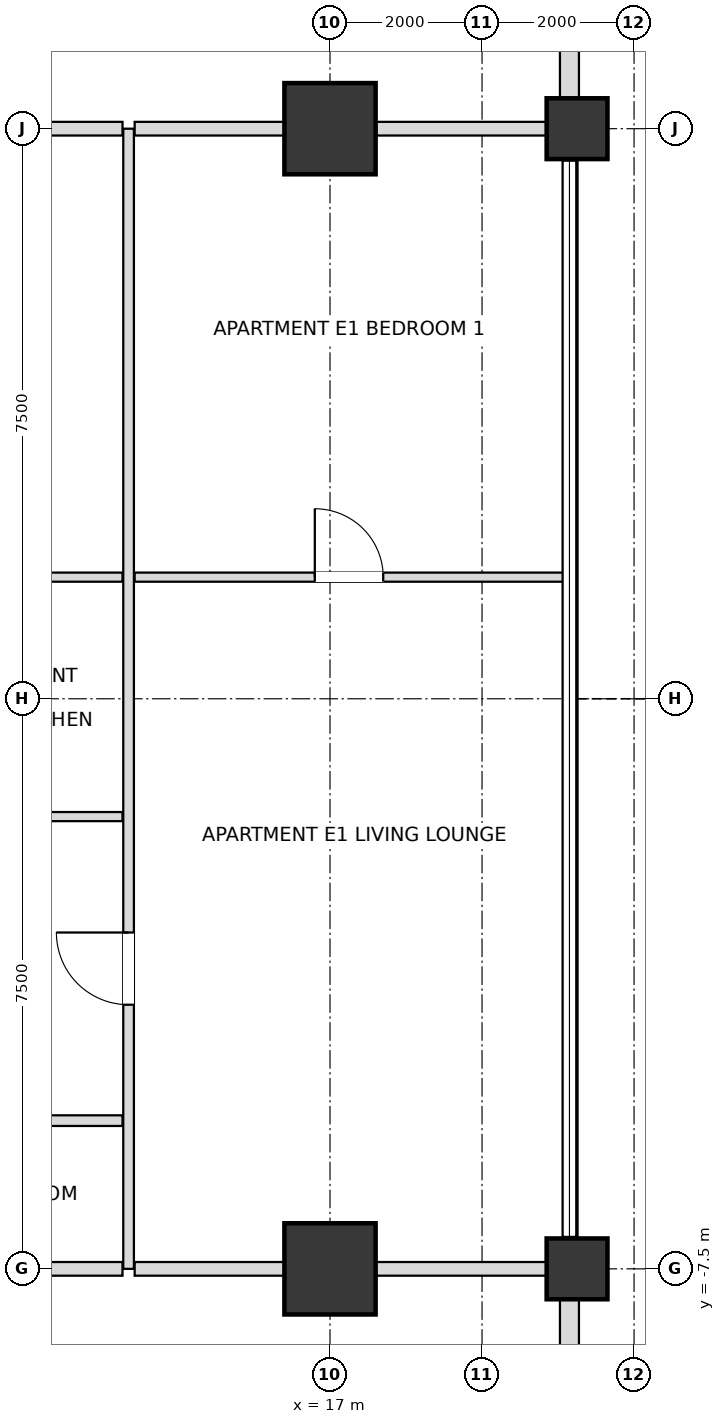
"""IFC4 building model, lengths in metres.
Left out: names, types, materials, properties, quantities, classifications, styles, units other than length and angle.
Written with IfcOpenShell. Run it as: python <this file> out.ifc"""

import sys

from ifc_helpers import new_model, si_unit, direction, frame, frame_2d, origin, origin_2d, place, context, subcontext, project, spatial, rectangle, extrude, element, fill, save


model = new_model("IFC4")
c1 = context("Model", 3, precision=1e-05, world=origin(), true_north=direction((0.0, 1.0)))
c2 = subcontext(c1, "Body", "Model", "MODEL_VIEW")
j1 = project(units=[si_unit("LENGTHUNIT", "METRE"), si_unit("PLANEANGLEUNIT", "RADIAN")], contexts=[c1])
p1 = place(None, origin())
s1 = spatial("IfcSite", under=j1, at=p1, CompositionType="ELEMENT")
p2 = place(p1, origin())
s2 = spatial("IfcBuilding", under=s1, at=p2, CompositionType="ELEMENT")
p3 = place(p2, frame((0.0, 0.0, 154.8)))
s3 = spatial("IfcBuildingStorey", under=s2, at=p3, CompositionType="ELEMENT", Elevation=154.8)
for number, where, z_axis, x_axis in (
    (1, (17.0, -7.5, 0.0), (0.0, 0.0, 1.0), (1.0, 0.0, 0.0)),
    (2, (17.0, 7.5, 0.0), (0.0, 0.0, 1.0), (1.0, 0.0, 0.0)),
):
    element("IfcColumn", number, at=place(p3, frame(where, z_axis=z_axis, x_axis=x_axis)), inside=s3, PredefinedType="USERDEFINED", context=c2, shape_type="SweptSolid", body=[
        extrude(rectangle(XDim=1.2, YDim=1.2, at=origin_2d()), origin(), (0.0, 0.0, 1.0), 3.6),
    ])
for number, where, z_axis, x_axis in (
    (3, (20.25, -7.5, 0.0), (0.0, 0.0, 1.0), (1.0, 0.0, 0.0)),
    (4, (20.25, 7.5, 0.0), (0.0, 0.0, 1.0), (1.0, 0.0, 0.0)),
):
    element("IfcColumn", number, at=place(p3, frame(where, z_axis=z_axis, x_axis=x_axis)), inside=s3, PredefinedType="COLUMN", context=c2, shape_type="SweptSolid", body=[
        extrude(rectangle(XDim=0.8, YDim=0.8, at=origin_2d()), origin(), (0.0, 0.0, 1.0), 3.6),
    ])
p4 = place(p3, frame((20.15, -12.605, 0.0), z_axis=(0.0, 0.0, 1.0), x_axis=(0.0, 1.0, 0.0)))
e5 = element("IfcWall", 5, at=p4, inside=s3, PredefinedType="SOLIDWALL", context=c2, shape_type="SweptSolid", body=[
    extrude(rectangle(XDim=4.71, YDim=0.25, at=frame_2d((2.355, 0.0))), origin(), (0.0, 0.0, 1.0), 2.736),
])
p5 = place(p4, frame((1.455, 0.0, 0.72)))
e6 = element("IfcOpeningElement", 6, at=p5, cuts=e5, PredefinedType="OPENING", context=c2, shape_type="SweptSolid", body=[
    extrude(rectangle(XDim=1.8, YDim=1.68, at=frame_2d((0.9, 0.84))), frame((0.0, 0.135, 0.0), z_axis=(0.0, -1.0, 0.0), x_axis=(1.0, 0.0, 0.0)), (0.0, 0.0, 1.0), 0.27),
])
p6 = place(p3, frame((20.15, 7.895, 0.0), z_axis=(0.0, 0.0, 1.0), x_axis=(0.0, 1.0, 0.0)))
e7 = element("IfcWall", 7, at=p6, inside=s3, PredefinedType="SOLIDWALL", context=c2, shape_type="SweptSolid", body=[
    extrude(rectangle(XDim=4.71, YDim=0.25, at=frame_2d((2.355, 0.0))), origin(), (0.0, 0.0, 1.0), 2.736),
])
p7 = place(p6, frame((1.455, 0.0, 0.72)))
e8 = element("IfcOpeningElement", 8, at=p7, cuts=e7, PredefinedType="OPENING", context=c2, shape_type="SweptSolid", body=[
    extrude(rectangle(XDim=1.8, YDim=1.68, at=frame_2d((0.9, 0.84))), frame((0.0, 0.135, 0.0), z_axis=(0.0, -1.0, 0.0), x_axis=(1.0, 0.0, 0.0)), (0.0, 0.0, 1.0), 0.27),
])
p8 = place(p3, frame((14.35, -7.5, 0.0), z_axis=(0.0, 0.0, 1.0), x_axis=(0.0, 1.0, 0.0)))
e9 = element("IfcWall", 9, at=p8, inside=s3, PredefinedType="PARTITIONING", context=c2, shape_type="SweptSolid", body=[
    extrude(rectangle(XDim=15.0, YDim=0.14, at=frame_2d((7.5, 0.0))), origin(), (0.0, 0.0, 1.0), 3.38),
])
p9 = place(p8, frame((3.475, 0.0, 0.0)))
e10 = element("IfcOpeningElement", 10, at=p9, cuts=e9, PredefinedType="OPENING", context=c2, shape_type="SweptSolid", body=[
    extrude(rectangle(XDim=0.95, YDim=2.1, at=frame_2d((0.475, 1.05))), frame((0.0, 0.08, 0.0), z_axis=(0.0, -1.0, 0.0), x_axis=(1.0, 0.0, 0.0)), (0.0, 0.0, 1.0), 0.16),
])
p10 = place(p3, frame((8.88, -7.5, 0.0), z_axis=(0.0, 0.0, 1.0), x_axis=(1.0, 0.0, 0.0)))
e11 = element("IfcWall", 11, at=p10, inside=s3, PredefinedType="PARTITIONING", context=c2, shape_type="SweptSolid", body=[
    extrude(rectangle(XDim=5.39, YDim=0.18, at=frame_2d((2.695, 0.0))), origin(), (0.0, 0.0, 1.0), 2.816),
])
p11 = place(p3, frame((14.43, -7.5, 0.0), z_axis=(0.0, 0.0, 1.0), x_axis=(1.0, 0.0, 0.0)))
e12 = element("IfcWall", 12, at=p11, inside=s3, PredefinedType="PARTITIONING", context=c2, shape_type="SweptSolid", body=[
    extrude(rectangle(XDim=5.72, YDim=0.18, at=frame_2d((2.86, 0.0))), origin(), (0.0, 0.0, 1.0), 2.816),
])
p12 = place(p3, frame((8.88, -5.55, 0.0), z_axis=(0.0, 0.0, 1.0), x_axis=(1.0, 0.0, 0.0)))
e13 = element("IfcWall", 13, at=p12, inside=s3, PredefinedType="PARTITIONING", context=c2, shape_type="SweptSolid", body=[
    extrude(rectangle(XDim=5.39, YDim=0.14, at=frame_2d((2.695, 0.0))), origin(), (0.0, 0.0, 1.0), 3.38),
])
p13 = place(p12, frame((2.24, 0.0, 0.0)))
e14 = element("IfcOpeningElement", 14, at=p13, cuts=e13, PredefinedType="OPENING", context=c2, shape_type="SweptSolid", body=[
    extrude(rectangle(XDim=0.9, YDim=2.1, at=frame_2d((0.45, 1.05))), frame((0.0, 0.08, 0.0), z_axis=(0.0, -1.0, 0.0), x_axis=(1.0, 0.0, 0.0)), (0.0, 0.0, 1.0), 0.16),
])
p14 = place(p3, frame((8.88, -1.55, 0.0), z_axis=(0.0, 0.0, 1.0), x_axis=(1.0, 0.0, 0.0)))
e15 = element("IfcWall", 15, at=p14, inside=s3, PredefinedType="PARTITIONING", context=c2, shape_type="SweptSolid", body=[
    extrude(rectangle(XDim=5.39, YDim=0.12, at=frame_2d((2.695, 0.0))), origin(), (0.0, 0.0, 1.0), 3.38),
])
p15 = place(p14, frame((2.215, 0.0, 0.0)))
e16 = element("IfcOpeningElement", 16, at=p15, cuts=e15, PredefinedType="OPENING", context=c2, shape_type="SweptSolid", body=[
    extrude(rectangle(XDim=0.95, YDim=2.1, at=frame_2d((0.475, 1.05))), frame((0.0, 0.07, 0.0), z_axis=(0.0, -1.0, 0.0), x_axis=(1.0, 0.0, 0.0)), (0.0, 0.0, 1.0), 0.14),
])
p16 = place(p3, frame((8.88, 1.6, 0.0), z_axis=(0.0, 0.0, 1.0), x_axis=(1.0, 0.0, 0.0)))
e17 = element("IfcWall", 17, at=p16, inside=s3, PredefinedType="PARTITIONING", context=c2, shape_type="SweptSolid", body=[
    extrude(rectangle(XDim=5.39, YDim=0.12, at=frame_2d((2.695, 0.0))), origin(), (0.0, 0.0, 1.0), 3.38),
])
p17 = place(p16, frame((2.24, 0.0, 0.0)))
e18 = element("IfcOpeningElement", 18, at=p17, cuts=e17, PredefinedType="OPENING", context=c2, shape_type="SweptSolid", body=[
    extrude(rectangle(XDim=0.9, YDim=2.1, at=frame_2d((0.45, 1.05))), frame((0.0, 0.07, 0.0), z_axis=(0.0, -1.0, 0.0), x_axis=(1.0, 0.0, 0.0)), (0.0, 0.0, 1.0), 0.14),
])
p18 = place(p3, frame((14.43, 1.6, 0.0), z_axis=(0.0, 0.0, 1.0), x_axis=(1.0, 0.0, 0.0)))
e19 = element("IfcWall", 19, at=p18, inside=s3, PredefinedType="PARTITIONING", context=c2, shape_type="SweptSolid", body=[
    extrude(rectangle(XDim=5.64, YDim=0.12, at=frame_2d((2.82, 0.0))), origin(), (0.0, 0.0, 1.0), 2.816),
])
p19 = place(p18, frame((2.37, 0.0, 0.0)))
e20 = element("IfcOpeningElement", 20, at=p19, cuts=e19, PredefinedType="OPENING", context=c2, shape_type="SweptSolid", body=[
    extrude(rectangle(XDim=0.9, YDim=2.1, at=frame_2d((0.45, 1.05))), frame((0.0, 0.07, 0.0), z_axis=(0.0, -1.0, 0.0), x_axis=(1.0, 0.0, 0.0)), (0.0, 0.0, 1.0), 0.14),
])
p20 = place(p3, frame((8.88, 7.5, 0.0), z_axis=(0.0, 0.0, 1.0), x_axis=(1.0, 0.0, 0.0)))
e21 = element("IfcWall", 21, at=p20, inside=s3, PredefinedType="PARTITIONING", context=c2, shape_type="SweptSolid", body=[
    extrude(rectangle(XDim=5.39, YDim=0.18, at=frame_2d((2.695, 0.0))), origin(), (0.0, 0.0, 1.0), 2.816),
])
p21 = place(p3, frame((14.43, 7.5, 0.0), z_axis=(0.0, 0.0, 1.0), x_axis=(1.0, 0.0, 0.0)))
e22 = element("IfcWall", 22, at=p21, inside=s3, PredefinedType="PARTITIONING", context=c2, shape_type="SweptSolid", body=[
    extrude(rectangle(XDim=5.72, YDim=0.18, at=frame_2d((2.86, 0.0))), origin(), (0.0, 0.0, 1.0), 2.816),
])
p22 = place(p9, origin())
e23 = element("IfcDoor", 23, at=p22, inside=s3, OperationType="SINGLE_SWING_RIGHT", PredefinedType="DOOR", context=c2, shape_type="SweptSolid", body=[
    extrude(rectangle(XDim=0.95, YDim=2.1, at=frame_2d((0.475, 1.05))), frame((0.0, 0.025, 0.0), z_axis=(0.0, -1.0, 0.0), x_axis=(1.0, 0.0, 0.0)), (0.0, 0.0, 1.0), 0.05),
])
fill(e10, e23)
p23 = place(p19, origin())
e24 = element("IfcDoor", 24, at=p23, inside=s3, OperationType="SINGLE_SWING_LEFT", PredefinedType="DOOR", context=c2, shape_type="SweptSolid", body=[
    extrude(rectangle(XDim=0.9, YDim=2.1, at=frame_2d((0.45, 1.05))), frame((0.0, 0.025, 0.0), z_axis=(0.0, -1.0, 0.0), x_axis=(1.0, 0.0, 0.0)), (0.0, 0.0, 1.0), 0.05),
])
fill(e20, e24)
save(model, sys.argv[1])
